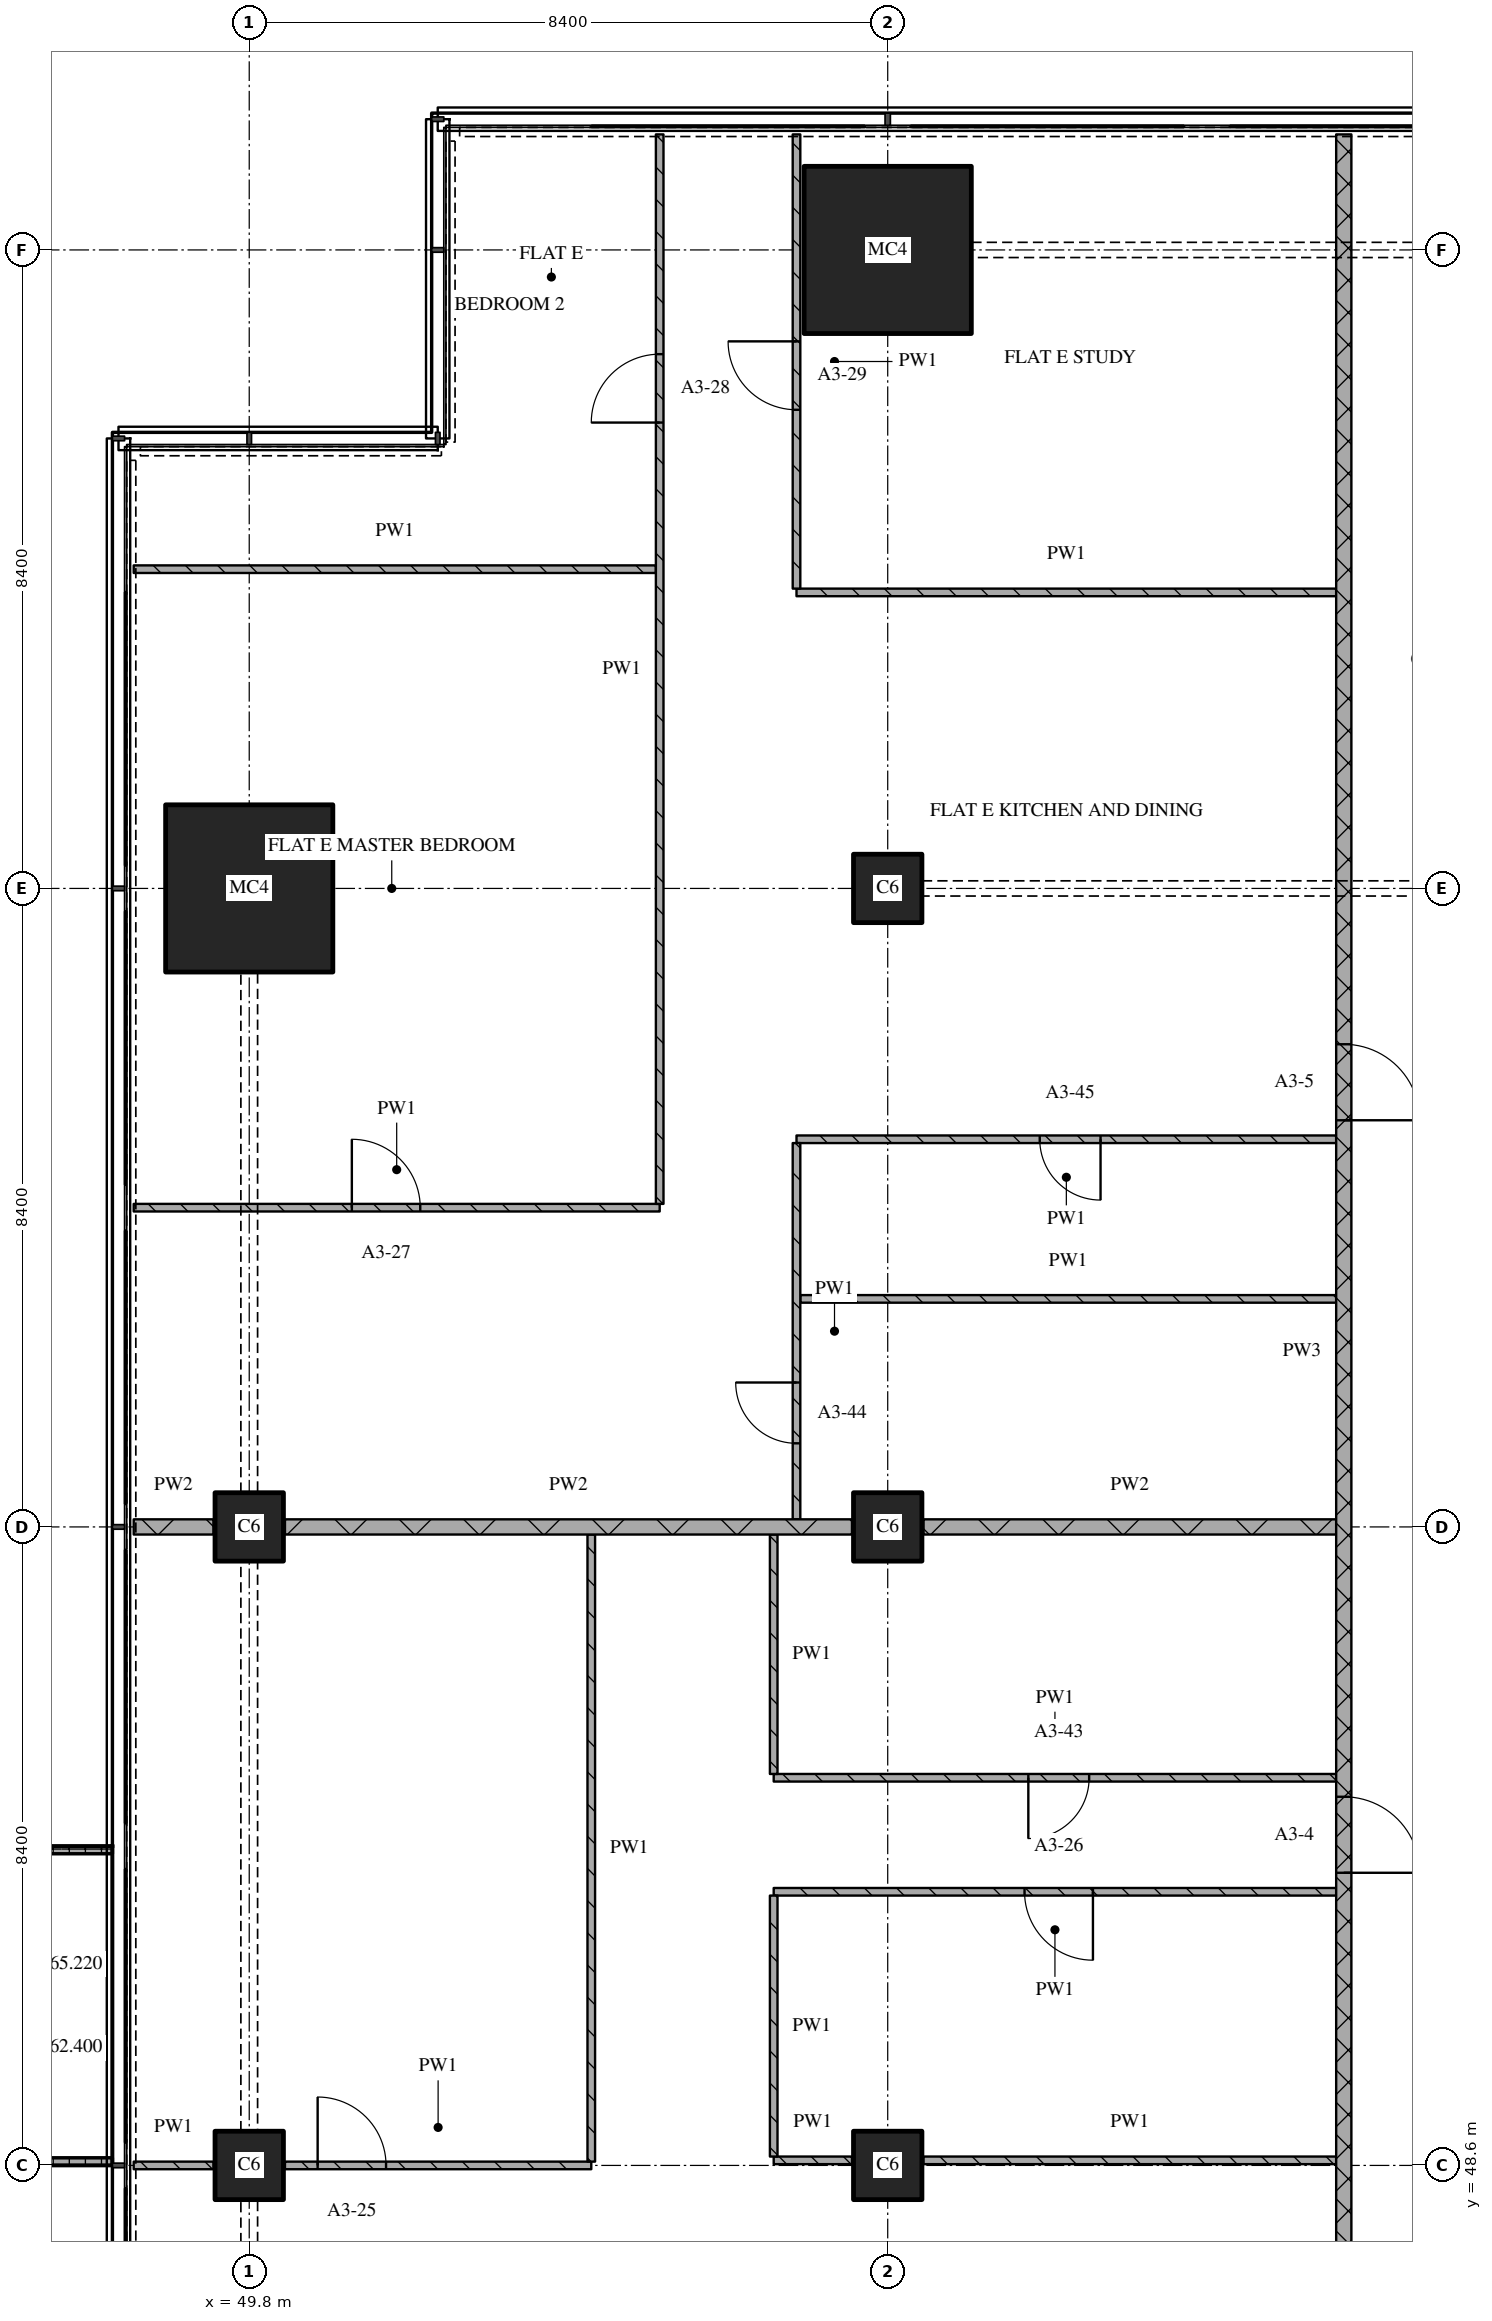
"""IFC4 building model, lengths in metres.
Left out: names, types, materials, properties, quantities, classifications, styles, units other than length and angle.
Written with IfcOpenShell. Run it as: python <this file> out.ifc"""

import sys

from ifc_helpers import new_model, si_unit, direction, frame, frame_2d, origin, origin_2d, place, context, subcontext, project, spatial, polyline, rectangle, outline, extrude, element, fill, save


model = new_model("IFC4")
c1 = context("Model", 3, precision=1e-05, world=origin(), true_north=direction((0.0, 1.0)))
c2 = subcontext(c1, "Body", "Model", "MODEL_VIEW")
j1 = project(units=[si_unit("LENGTHUNIT", "METRE"), si_unit("PLANEANGLEUNIT", "RADIAN")], contexts=[c1])
p1 = place(None, origin())
s1 = spatial("IfcSite", under=j1, at=p1, CompositionType="ELEMENT")
p2 = place(p1, origin())
s2 = spatial("IfcBuilding", under=s1, at=p2, CompositionType="ELEMENT")
p3 = place(p2, frame((0.0, 0.0, 62.4)))
s3 = spatial("IfcBuildingStorey", under=s2, at=p3, CompositionType="ELEMENT", Elevation=62.4)
for number, where, z_axis, x_axis in (
    (1, (49.8, 48.6, 0.0), (0.0, 0.0, 1.0), (1.0, 0.0, 0.0)),
    (2, (49.8, 57.0, 0.0), (0.0, 0.0, 1.0), (1.0, 0.0, 0.0)),
):
    element("IfcColumn", number, at=place(p3, frame(where, z_axis=z_axis, x_axis=x_axis)), inside=s3, PredefinedType="COLUMN", context=c2, shape_type="SweptSolid", body=[
        extrude(rectangle(XDim=0.9, YDim=0.9, at=origin_2d()), origin(), (0.0, 0.0, 1.0), 3.6),
    ])
p4 = place(p3, frame((49.8, 65.4, 0.0), z_axis=(0.0, 0.0, 1.0), x_axis=(1.0, 0.0, 0.0)))
e3 = element("IfcColumn", 3, at=p4, inside=s3, PredefinedType="COLUMN", context=c2, shape_type="SweptSolid", body=[
    extrude(rectangle(XDim=2.2, YDim=2.2, at=origin_2d()), origin(), (0.0, 0.0, 1.0), 3.6),
])
for number, where, z_axis, x_axis in (
    (4, (58.2, 48.6, 0.0), (0.0, 0.0, 1.0), (1.0, 0.0, 0.0)),
    (5, (58.2, 57.0, 0.0), (0.0, 0.0, 1.0), (1.0, 0.0, 0.0)),
    (6, (58.2, 65.4, 0.0), (0.0, 0.0, 1.0), (1.0, 0.0, 0.0)),
):
    element("IfcColumn", number, at=place(p3, frame(where, z_axis=z_axis, x_axis=x_axis)), inside=s3, PredefinedType="COLUMN", context=c2, shape_type="SweptSolid", body=[
        extrude(rectangle(XDim=0.9, YDim=0.9, at=origin_2d()), origin(), (0.0, 0.0, 1.0), 3.6),
    ])
p5 = place(p3, frame((58.2, 73.8, 0.0), z_axis=(0.0, 0.0, 1.0), x_axis=(1.0, 0.0, 0.0)))
e7 = element("IfcColumn", 7, at=p5, inside=s3, PredefinedType="COLUMN", context=c2, shape_type="SweptSolid", body=[
    extrude(rectangle(XDim=2.2, YDim=2.2, at=origin_2d()), origin(), (0.0, 0.0, 1.0), 3.6),
])
p6 = place(p3, origin())
e8 = element("IfcWall", 8, at=p6, inside=s3, PredefinedType="SOLIDWALL", context=c2, shape_type="SweptSolid", body=[
    extrude(outline(polyline([(48.0, 52.8), (48.0, 52.7), (46.367, 52.7), (46.367, 48.7), (48.0, 48.7), (48.0, 48.6), (46.267, 48.6), (46.267, 52.8), (48.0, 52.8)])), origin(), (0.0, 0.0, 1.0), 1.0),
])
p7 = place(p3, frame((48.28, 48.6, 0.0), z_axis=(0.0, 0.0, 1.0), x_axis=(1.0, 0.0, 0.0)))
e9 = element("IfcWall", 9, at=p7, inside=s3, PredefinedType="PARTITIONING", context=c2, shape_type="SweptSolid", body=[
    extrude(rectangle(XDim=1.05, YDim=0.1, at=frame_2d((0.525, 0.0))), origin(), (0.0, 0.0, 1.0), 3.32),
])
p8 = place(p3, frame((50.27, 48.6, 0.0), z_axis=(0.0, 0.0, 1.0), x_axis=(1.0, 0.0, 0.0)))
e10 = element("IfcWall", 10, at=p8, inside=s3, PredefinedType="PARTITIONING", context=c2, shape_type="SweptSolid", body=[
    extrude(rectangle(XDim=4.03, YDim=0.1, at=frame_2d((2.015, 0.0))), origin(), (0.0, 0.0, 1.0), 3.32),
])
p9 = place(p8, frame((0.43, 0.0, 0.0)))
e11 = element("IfcOpeningElement", 11, at=p9, cuts=e10, PredefinedType="OPENING", context=c2, shape_type="SweptSolid", body=[
    extrude(rectangle(XDim=0.9, YDim=2.1, at=frame_2d((0.45, 1.05))), frame((0.0, 0.06, 0.0), z_axis=(0.0, -1.0, 0.0), x_axis=(1.0, 0.0, 0.0)), (0.0, 0.0, 1.0), 0.12),
])
p10 = place(p3, frame((56.7, 48.667, 0.0), z_axis=(0.0, 0.0, 1.0), x_axis=(1.0, 0.0, 0.0)))
e12 = element("IfcWall", 12, at=p10, inside=s3, PredefinedType="PARTITIONING", context=c2, shape_type="SweptSolid", body=[
    extrude(rectangle(XDim=1.03, YDim=0.1, at=frame_2d((0.515, 0.0))), origin(), (0.0, 0.0, 1.0), 3.32),
])
p11 = place(p3, frame((58.67, 48.667, 0.0), z_axis=(0.0, 0.0, 1.0), x_axis=(1.0, 0.0, 0.0)))
e13 = element("IfcWall", 13, at=p11, inside=s3, PredefinedType="PARTITIONING", context=c2, shape_type="SweptSolid", body=[
    extrude(rectangle(XDim=5.43, YDim=0.1, at=frame_2d((2.715, 0.0))), origin(), (0.0, 0.0, 1.0), 3.32),
])
p12 = place(p3, frame((64.1, 52.2, 0.0), z_axis=(0.0, 0.0, 1.0), x_axis=(-1.0, 0.0, 0.0)))
e14 = element("IfcWall", 14, at=p12, inside=s3, PredefinedType="PARTITIONING", context=c2, shape_type="SweptSolid", body=[
    extrude(rectangle(XDim=7.4, YDim=0.1, at=frame_2d((3.7, 0.0))), origin(), (0.0, 0.0, 1.0), 3.32),
])
p13 = place(p12, frame((3.2, 0.0, 0.0)))
e15 = element("IfcOpeningElement", 15, at=p13, cuts=e14, PredefinedType="OPENING", context=c2, shape_type="SweptSolid", body=[
    extrude(rectangle(XDim=0.9, YDim=2.1, at=frame_2d((0.45, 1.05))), frame((0.0, 0.06, 0.0), z_axis=(0.0, -1.0, 0.0), x_axis=(1.0, 0.0, 0.0)), (0.0, 0.0, 1.0), 0.12),
])
p14 = place(p3, frame((56.7, 53.7, 0.0), z_axis=(0.0, 0.0, 1.0), x_axis=(1.0, 0.0, 0.0)))
e16 = element("IfcWall", 16, at=p14, inside=s3, PredefinedType="PARTITIONING", context=c2, shape_type="SweptSolid", body=[
    extrude(rectangle(XDim=7.4, YDim=0.1, at=frame_2d((3.7, 0.0))), origin(), (0.0, 0.0, 1.0), 3.32),
])
p15 = place(p14, frame((3.35, 0.0, 0.0)))
e17 = element("IfcOpeningElement", 17, at=p15, cuts=e16, PredefinedType="OPENING", context=c2, shape_type="SweptSolid", body=[
    extrude(rectangle(XDim=0.8, YDim=2.1, at=frame_2d((0.4, 1.05))), frame((0.0, 0.06, 0.0), z_axis=(0.0, -1.0, 0.0), x_axis=(1.0, 0.0, 0.0)), (0.0, 0.0, 1.0), 0.12),
])
p16 = place(p3, frame((48.28, 57.0, 0.0), z_axis=(0.0, 0.0, 1.0), x_axis=(1.0, 0.0, 0.0)))
e18 = element("IfcWall", 18, at=p16, inside=s3, PredefinedType="PARTITIONING", context=c2, shape_type="SweptSolid", body=[
    extrude(rectangle(XDim=1.05, YDim=0.2, at=frame_2d((0.525, 0.0))), origin(), (0.0, 0.0, 1.0), 3.32),
])
p17 = place(p3, frame((50.27, 57.0, 0.0), z_axis=(0.0, 0.0, 1.0), x_axis=(1.0, 0.0, 0.0)))
e19 = element("IfcWall", 19, at=p17, inside=s3, PredefinedType="PARTITIONING", context=c2, shape_type="SweptSolid", body=[
    extrude(rectangle(XDim=7.46, YDim=0.2, at=frame_2d((3.73, 0.0))), origin(), (0.0, 0.0, 1.0), 3.32),
])
p18 = place(p3, frame((58.67, 57.0, 0.0), z_axis=(0.0, 0.0, 1.0), x_axis=(1.0, 0.0, 0.0)))
e20 = element("IfcWall", 20, at=p18, inside=s3, PredefinedType="PARTITIONING", context=c2, shape_type="SweptSolid", body=[
    extrude(rectangle(XDim=5.43, YDim=0.2, at=frame_2d((2.715, 0.0))), origin(), (0.0, 0.0, 1.0), 3.32),
])
p19 = place(p3, frame((57.05, 60.0, 0.0), z_axis=(0.0, 0.0, 1.0), x_axis=(1.0, 0.0, 0.0)))
e21 = element("IfcWall", 21, at=p19, inside=s3, PredefinedType="PARTITIONING", context=c2, shape_type="SweptSolid", body=[
    extrude(rectangle(XDim=7.05, YDim=0.1, at=frame_2d((3.525, 0.0))), origin(), (0.0, 0.0, 1.0), 3.32),
])
p20 = place(p3, frame((48.28, 61.2, 0.0), z_axis=(0.0, 0.0, 1.0), x_axis=(1.0, 0.0, 0.0)))
e22 = element("IfcWall", 22, at=p20, inside=s3, PredefinedType="PARTITIONING", context=c2, shape_type="SweptSolid", body=[
    extrude(rectangle(XDim=6.92, YDim=0.1, at=frame_2d((3.46, 0.0))), origin(), (0.0, 0.0, 1.0), 3.32),
])
p21 = place(p20, frame((2.87, 0.0, 0.0)))
e23 = element("IfcOpeningElement", 23, at=p21, cuts=e22, PredefinedType="OPENING", context=c2, shape_type="SweptSolid", body=[
    extrude(rectangle(XDim=0.9, YDim=2.1, at=frame_2d((0.45, 1.05))), frame((0.0, 0.06, 0.0), z_axis=(0.0, -1.0, 0.0), x_axis=(1.0, 0.0, 0.0)), (0.0, 0.0, 1.0), 0.12),
])
p22 = place(p3, frame((64.1, 62.1, 0.0), z_axis=(0.0, 0.0, 1.0), x_axis=(-1.0, 0.0, 0.0)))
e24 = element("IfcWall", 24, at=p22, inside=s3, PredefinedType="PARTITIONING", context=c2, shape_type="SweptSolid", body=[
    extrude(rectangle(XDim=7.1, YDim=0.1, at=frame_2d((3.55, 0.0))), origin(), (0.0, 0.0, 1.0), 3.32),
])
p23 = place(p22, frame((3.1, 0.0, 0.0)))
e25 = element("IfcOpeningElement", 25, at=p23, cuts=e24, PredefinedType="OPENING", context=c2, shape_type="SweptSolid", body=[
    extrude(rectangle(XDim=0.8, YDim=2.1, at=frame_2d((0.4, 1.05))), frame((0.0, 0.06, 0.0), z_axis=(0.0, -1.0, 0.0), x_axis=(1.0, 0.0, 0.0)), (0.0, 0.0, 1.0), 0.12),
])
p24 = place(p3, frame((57.0, 69.294, 0.0), z_axis=(0.0, 0.0, 1.0), x_axis=(1.0, 0.0, 0.0)))
e26 = element("IfcWall", 26, at=p24, inside=s3, PredefinedType="PARTITIONING", context=c2, shape_type="SweptSolid", body=[
    extrude(rectangle(XDim=7.1, YDim=0.1, at=frame_2d((3.55, 0.0))), origin(), (0.0, 0.0, 1.0), 3.32),
])
p25 = place(p3, frame((48.28, 69.6, 0.0), z_axis=(0.0, 0.0, 1.0), x_axis=(1.0, 0.0, 0.0)))
e27 = element("IfcWall", 27, at=p25, inside=s3, PredefinedType="PARTITIONING", context=c2, shape_type="SweptSolid", body=[
    extrude(rectangle(XDim=6.87, YDim=0.1, at=frame_2d((3.435, 0.0))), origin(), (0.0, 0.0, 1.0), 3.32),
])
p26 = place(p3, frame((54.3, 56.9, 0.0), z_axis=(0.0, 0.0, 1.0), x_axis=(0.0, -1.0, 0.0)))
e28 = element("IfcWall", 28, at=p26, inside=s3, PredefinedType="PARTITIONING", context=c2, shape_type="SweptSolid", body=[
    extrude(rectangle(XDim=8.25, YDim=0.1, at=frame_2d((4.125, 0.0))), origin(), (0.0, 0.0, 1.0), 3.32),
])
p27 = place(p3, frame((55.2, 61.25, 0.0), z_axis=(0.0, 0.0, 1.0), x_axis=(0.0, 1.0, 0.0)))
e29 = element("IfcWall", 29, at=p27, inside=s3, PredefinedType="PARTITIONING", context=c2, shape_type="SweptSolid", body=[
    extrude(rectangle(XDim=14.07, YDim=0.1, at=frame_2d((7.035, 0.0))), origin(), (0.0, 0.0, 1.0), 3.32),
])
p28 = place(p27, frame((10.279, 0.0, 0.0)))
e30 = element("IfcOpeningElement", 30, at=p28, cuts=e29, PredefinedType="OPENING", context=c2, shape_type="SweptSolid", body=[
    extrude(rectangle(XDim=0.9, YDim=2.1, at=frame_2d((0.45, 1.05))), frame((0.0, 0.06, 0.0), z_axis=(0.0, -1.0, 0.0), x_axis=(1.0, 0.0, 0.0)), (0.0, 0.0, 1.0), 0.12),
])
p29 = place(p3, frame((56.7, 52.15, 0.0), z_axis=(0.0, 0.0, 1.0), x_axis=(0.0, -1.0, 0.0)))
e31 = element("IfcWall", 31, at=p29, inside=s3, PredefinedType="PARTITIONING", context=c2, shape_type="SweptSolid", body=[
    extrude(rectangle(XDim=3.433, YDim=0.1, at=frame_2d((1.717, 0.0))), origin(), (0.0, 0.0, 1.0), 3.32),
])
p30 = place(p3, frame((56.7, 56.9, 0.0), z_axis=(0.0, 0.0, 1.0), x_axis=(0.0, -1.0, 0.0)))
e32 = element("IfcWall", 32, at=p30, inside=s3, PredefinedType="PARTITIONING", context=c2, shape_type="SweptSolid", body=[
    extrude(rectangle(XDim=3.15, YDim=0.1, at=frame_2d((1.575, 0.0))), origin(), (0.0, 0.0, 1.0), 3.32),
])
p31 = place(p3, frame((57.0, 62.05, 0.0), z_axis=(0.0, 0.0, 1.0), x_axis=(0.0, -1.0, 0.0)))
e33 = element("IfcWall", 33, at=p31, inside=s3, PredefinedType="PARTITIONING", context=c2, shape_type="SweptSolid", body=[
    extrude(rectangle(XDim=4.95, YDim=0.1, at=frame_2d((2.475, 0.0))), origin(), (0.0, 0.0, 1.0), 3.32),
])
p32 = place(p31, frame((3.15, 0.0, 0.0)))
e34 = element("IfcOpeningElement", 34, at=p32, cuts=e33, PredefinedType="OPENING", context=c2, shape_type="SweptSolid", body=[
    extrude(rectangle(XDim=0.8, YDim=2.1, at=frame_2d((0.4, 1.05))), frame((0.0, 0.06, 0.0), z_axis=(0.0, -1.0, 0.0), x_axis=(1.0, 0.0, 0.0)), (0.0, 0.0, 1.0), 0.12),
])
p33 = place(p3, frame((57.0, 75.32, 0.0), z_axis=(0.0, 0.0, 1.0), x_axis=(0.0, -1.0, 0.0)))
e35 = element("IfcWall", 35, at=p33, inside=s3, PredefinedType="PARTITIONING", context=c2, shape_type="SweptSolid", body=[
    extrude(rectangle(XDim=5.976, YDim=0.1, at=frame_2d((2.988, 0.0))), origin(), (0.0, 0.0, 1.0), 3.32),
])
p34 = place(p33, frame((2.723, 0.0, 0.0)))
e36 = element("IfcOpeningElement", 36, at=p34, cuts=e35, PredefinedType="OPENING", context=c2, shape_type="SweptSolid", body=[
    extrude(rectangle(XDim=0.9, YDim=2.1, at=frame_2d((0.45, 1.05))), frame((0.0, 0.06, 0.0), z_axis=(0.0, -1.0, 0.0), x_axis=(1.0, 0.0, 0.0)), (0.0, 0.0, 1.0), 0.12),
])
p35 = place(p3, frame((64.2, 43.3, 0.0), z_axis=(0.0, 0.0, 1.0), x_axis=(0.0, 1.0, 0.0)))
e37 = element("IfcWall", 37, at=p35, inside=s3, PredefinedType="PARTITIONING", context=c2, shape_type="SweptSolid", body=[
    extrude(rectangle(XDim=32.02, YDim=0.2, at=frame_2d((16.01, 0.0))), origin(), (0.0, 0.0, 1.0), 3.32),
])
p36 = place(p35, frame((9.15, 0.0, 0.0)))
e38 = element("IfcOpeningElement", 38, at=p36, cuts=e37, PredefinedType="OPENING", context=c2, shape_type="SweptSolid", body=[
    extrude(rectangle(XDim=1.0, YDim=2.1, at=frame_2d((0.5, 1.05))), frame((0.0, 0.11, 0.0), z_axis=(0.0, -1.0, 0.0), x_axis=(1.0, 0.0, 0.0)), (0.0, 0.0, 1.0), 0.22),
])
p37 = place(p35, frame((19.05, 0.0, 0.0)))
e39 = element("IfcOpeningElement", 39, at=p37, cuts=e37, PredefinedType="OPENING", context=c2, shape_type="SweptSolid", body=[
    extrude(rectangle(XDim=1.0, YDim=2.1, at=frame_2d((0.5, 1.05))), frame((0.0, 0.11, 0.0), z_axis=(0.0, -1.0, 0.0), x_axis=(1.0, 0.0, 0.0)), (0.0, 0.0, 1.0), 0.22),
])
p38 = place(p9, origin())
e40 = element("IfcDoor", 40, at=p38, inside=s3, OperationType="SINGLE_SWING_LEFT", PredefinedType="DOOR", context=c2, shape_type="SweptSolid", body=[
    extrude(rectangle(XDim=0.9, YDim=2.1, at=frame_2d((0.45, 1.05))), frame((0.0, 0.025, 0.0), z_axis=(0.0, -1.0, 0.0), x_axis=(1.0, 0.0, 0.0)), (0.0, 0.0, 1.0), 0.05),
])
fill(e11, e40)
p39 = place(p13, origin())
e41 = element("IfcDoor", 41, at=p39, inside=s3, OperationType="SINGLE_SWING_LEFT", PredefinedType="DOOR", context=c2, shape_type="SweptSolid", body=[
    extrude(rectangle(XDim=0.9, YDim=2.1, at=frame_2d((0.45, 1.05))), frame((0.0, 0.025, 0.0), z_axis=(0.0, -1.0, 0.0), x_axis=(1.0, 0.0, 0.0)), (0.0, 0.0, 1.0), 0.05),
])
fill(e15, e41)
p40 = place(p15, origin())
e42 = element("IfcDoor", 42, at=p40, inside=s3, OperationType="SINGLE_SWING_RIGHT", PredefinedType="DOOR", context=c2, shape_type="SweptSolid", body=[
    extrude(rectangle(XDim=0.8, YDim=2.1, at=frame_2d((0.4, 1.05))), frame((0.0, 0.025, 0.0), z_axis=(0.0, -1.0, 0.0), x_axis=(1.0, 0.0, 0.0)), (0.0, 0.0, 1.0), 0.05),
])
fill(e17, e42)
p41 = place(p21, origin())
e43 = element("IfcDoor", 43, at=p41, inside=s3, OperationType="SINGLE_SWING_LEFT", PredefinedType="DOOR", context=c2, shape_type="SweptSolid", body=[
    extrude(rectangle(XDim=0.9, YDim=2.1, at=frame_2d((0.45, 1.05))), frame((0.0, 0.025, 0.0), z_axis=(0.0, -1.0, 0.0), x_axis=(1.0, 0.0, 0.0)), (0.0, 0.0, 1.0), 0.05),
])
fill(e23, e43)
p42 = place(p23, origin())
e44 = element("IfcDoor", 44, at=p42, inside=s3, OperationType="SINGLE_SWING_LEFT", PredefinedType="DOOR", context=c2, shape_type="SweptSolid", body=[
    extrude(rectangle(XDim=0.8, YDim=2.1, at=frame_2d((0.4, 1.05))), frame((0.0, 0.025, 0.0), z_axis=(0.0, -1.0, 0.0), x_axis=(1.0, 0.0, 0.0)), (0.0, 0.0, 1.0), 0.05),
])
fill(e25, e44)
p43 = place(p28, origin())
e45 = element("IfcDoor", 45, at=p43, inside=s3, OperationType="SINGLE_SWING_LEFT", PredefinedType="DOOR", context=c2, shape_type="SweptSolid", body=[
    extrude(rectangle(XDim=0.9, YDim=2.1, at=frame_2d((0.45, 1.05))), frame((0.0, 0.025, 0.0), z_axis=(0.0, -1.0, 0.0), x_axis=(1.0, 0.0, 0.0)), (0.0, 0.0, 1.0), 0.05),
])
fill(e30, e45)
p44 = place(p32, origin())
e46 = element("IfcDoor", 46, at=p44, inside=s3, OperationType="SINGLE_SWING_RIGHT", PredefinedType="DOOR", context=c2, shape_type="SweptSolid", body=[
    extrude(rectangle(XDim=0.8, YDim=2.1, at=frame_2d((0.4, 1.05))), frame((0.0, 0.025, 0.0), z_axis=(0.0, -1.0, 0.0), x_axis=(1.0, 0.0, 0.0)), (0.0, 0.0, 1.0), 0.05),
])
fill(e34, e46)
p45 = place(p34, origin())
e47 = element("IfcDoor", 47, at=p45, inside=s3, OperationType="SINGLE_SWING_RIGHT", PredefinedType="DOOR", context=c2, shape_type="SweptSolid", body=[
    extrude(rectangle(XDim=0.9, YDim=2.1, at=frame_2d((0.45, 1.05))), frame((0.0, 0.025, 0.0), z_axis=(0.0, -1.0, 0.0), x_axis=(1.0, 0.0, 0.0)), (0.0, 0.0, 1.0), 0.05),
])
fill(e36, e47)
p46 = place(p36, origin())
e48 = element("IfcDoor", 48, at=p46, inside=s3, OperationType="SINGLE_SWING_RIGHT", PredefinedType="DOOR", context=c2, shape_type="SweptSolid", body=[
    extrude(rectangle(XDim=1.0, YDim=2.1, at=frame_2d((0.5, 1.05))), frame((0.0, 0.025, 0.0), z_axis=(0.0, -1.0, 0.0), x_axis=(1.0, 0.0, 0.0)), (0.0, 0.0, 1.0), 0.05),
])
fill(e38, e48)
p47 = place(p37, origin())
e49 = element("IfcDoor", 49, at=p47, inside=s3, OperationType="SINGLE_SWING_RIGHT", PredefinedType="DOOR", context=c2, shape_type="SweptSolid", body=[
    extrude(rectangle(XDim=1.0, YDim=2.1, at=frame_2d((0.5, 1.05))), frame((0.0, 0.025, 0.0), z_axis=(0.0, -1.0, 0.0), x_axis=(1.0, 0.0, 0.0)), (0.0, 0.0, 1.0), 0.05),
])
fill(e39, e49)
save(model, sys.argv[1])
